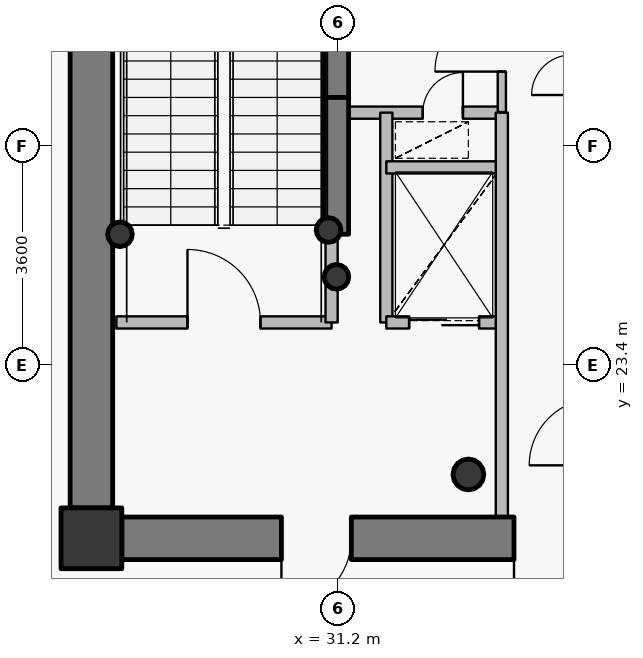
"""IFC4 building model, lengths in metres.
Left out: names, types, materials, properties, quantities, classifications, styles, units other than length and angle.
Written with IfcOpenShell. Run it as: python <this file> out.ifc"""

import sys

from ifc_helpers import new_model, si_unit, direction, frame, frame_2d, origin, origin_2d, place, context, subcontext, project, spatial, rectangle, hollow_circle, extrude, source, transform, mapped, element, fill, save


model = new_model("IFC4")
c1 = context("Model", 3, precision=1e-05, world=origin(), true_north=direction((0.0, 1.0)))
c2 = subcontext(c1, "Body", "Model", "MODEL_VIEW")
j1 = project(units=[si_unit("LENGTHUNIT", "METRE"), si_unit("PLANEANGLEUNIT", "RADIAN")], contexts=[c1])
p1 = place(None, origin())
s1 = spatial("IfcSite", under=j1, at=p1, CompositionType="ELEMENT")
p2 = place(p1, origin())
s2 = spatial("IfcBuilding", under=s1, at=p2, CompositionType="ELEMENT")
p3 = place(p2, frame((0.0, 0.0, 303.0)))
s3 = spatial("IfcBuildingStorey", under=s2, at=p3, CompositionType="ELEMENT", Elevation=303.0)
p4 = place(p3, frame((27.15, 20.55, 0.0), z_axis=(0.0, 0.0, 1.0), x_axis=(1.0, 0.0, 0.0)))
e1 = element("IfcColumn", 1, at=p4, inside=s3, PredefinedType="COLUMN", context=c2, shape_type="SweptSolid", body=[
    extrude(rectangle(XDim=1.0, YDim=1.0, at=origin_2d()), origin(), (0.0, 0.0, 1.0), 3.75),
])
p5 = place(p3, frame((33.35, 21.6, 0.0), z_axis=(0.0, 0.0, 1.0), x_axis=(1.0, 0.0, 0.0)))
e2 = element("IfcColumn", 2, at=p5, inside=s3, PredefinedType="COLUMN", context=c2, shape_type="SweptSolid", body=[
    extrude(hollow_circle(Radius=0.254, WallThickness=0.02, at=origin_2d()), origin(), (0.0, 0.0, 1.0), 3.75),
])
p6 = place(p3, frame((31.18, 27.8, 0.0), z_axis=(0.0, 0.0, 1.0), x_axis=(0.0, 1.0, 0.0)))
e3 = element("IfcWall", 3, at=p6, inside=s3, PredefinedType="SHEAR", context=c2, shape_type="SweptSolid", body=[
    extrude(rectangle(XDim=4.75, YDim=0.4, at=frame_2d((2.375, 0.0))), origin(), (0.0, 0.0, 1.0), 3.75),
])
for number, where, z_axis, x_axis in (
    (4, (31.05, 25.62, 0.0), (0.0, 0.0, 1.0), (1.0, 0.0, 0.0)),
    (5, (31.18, 24.85, 0.0), (0.0, 0.0, 1.0), (1.0, 0.0, 0.0)),
    (6, (27.62, 25.55, 0.0), (0.0, 0.0, 1.0), (1.0, 0.0, 0.0)),
):
    element("IfcColumn", number, at=place(p3, frame(where, z_axis=z_axis, x_axis=x_axis)), inside=s3, PredefinedType="COLUMN", context=c2, shape_type="SweptSolid", body=[
        extrude(hollow_circle(Radius=0.203, WallThickness=0.016, at=origin_2d()), origin(), (0.0, 0.0, 1.0), 3.75),
    ])
p7 = place(p3, frame((44.35, 20.55, 0.0), z_axis=(0.0, 0.0, 1.0), x_axis=(-1.0, 0.0, 0.0)))
e7 = element("IfcWall", 7, at=p7, inside=s3, PredefinedType="SHEAR", context=c2, shape_type="SweptSolid", body=[
    extrude(rectangle(XDim=16.7, YDim=0.7, at=frame_2d((8.35, 0.0))), origin(), (0.0, 0.0, 1.0), 3.05),
])
p8 = place(p7, frame((12.925, 0.0, 0.0)))
e8 = element("IfcOpeningElement", 8, at=p8, cuts=e7, PredefinedType="OPENING", context=c2, shape_type="SweptSolid", body=[
    extrude(rectangle(XDim=1.15, YDim=2.15, at=origin_2d()), frame((0.575, 0.36, 1.075), z_axis=(0.0, -1.0, 0.0), x_axis=(1.0, 0.0, 0.0)), (0.0, 0.0, 1.0), 0.72),
])
p9 = place(p7, frame((9.1, 0.0, 0.0)))
e9 = element("IfcOpeningElement", 9, at=p9, cuts=e7, PredefinedType="OPENING", context=c2, shape_type="SweptSolid", body=[
    extrude(rectangle(XDim=1.15, YDim=2.15, at=origin_2d()), frame((0.575, 0.36, 1.075), z_axis=(0.0, -1.0, 0.0), x_axis=(1.0, 0.0, 0.0)), (0.0, 0.0, 1.0), 0.72),
])
p10 = place(p3, frame((27.15, 21.05, 0.0), z_axis=(0.0, 0.0, 1.0), x_axis=(0.0, 1.0, 0.0)))
e10 = element("IfcWall", 10, at=p10, inside=s3, PredefinedType="SHEAR", context=c2, shape_type="SweptSolid", body=[
    extrude(rectangle(XDim=11.9, YDim=0.7, at=frame_2d((5.95, 0.0))), origin(), (0.0, 0.0, 1.0), 3.05),
])
p11 = place(p3, frame((31.18, 25.55, 0.0), z_axis=(0.0, 0.0, 1.0), x_axis=(0.0, 1.0, 0.0)))
e11 = element("IfcWall", 11, at=p11, inside=s3, PredefinedType="SHEAR", context=c2, shape_type="SweptSolid", body=[
    extrude(rectangle(XDim=2.25, YDim=0.4, at=frame_2d((1.125, 0.0))), origin(), (0.0, 0.0, 1.0), 3.1),
])
p12 = place(p3, frame((27.56, 24.1, 0.0), z_axis=(0.0, 0.0, 1.0), x_axis=(1.0, 0.0, 0.0)))
e12 = element("IfcWall", 12, at=p12, inside=s3, PredefinedType="PARTITIONING", context=c2, shape_type="SweptSolid", body=[
    extrude(rectangle(XDim=3.54, YDim=0.2, at=frame_2d((1.77, 0.0))), origin(), (0.0, 0.0, 1.0), 3.5),
])
p13 = place(p12, frame((1.17, 0.0, 0.0)))
e13 = element("IfcOpeningElement", 13, at=p13, cuts=e12, PredefinedType="OPENING", context=c2, shape_type="SweptSolid", body=[
    extrude(rectangle(XDim=1.2, YDim=2.15, at=origin_2d()), frame((0.6, 0.11, 1.075), z_axis=(0.0, -1.0, 0.0), x_axis=(1.0, 0.0, 0.0)), (0.0, 0.0, 1.0), 0.22),
])
p14 = place(p3, frame((31.1, 24.1, 0.0), z_axis=(0.0, 0.0, 1.0), x_axis=(0.0, 1.0, 0.0)))
e14 = element("IfcWall", 14, at=p14, inside=s3, PredefinedType="PARTITIONING", context=c2, shape_type="SweptSolid", body=[
    extrude(rectangle(XDim=1.44, YDim=0.2, at=frame_2d((0.72, 0.0))), origin(), (0.0, 0.0, 1.0), 3.5),
])
p15 = place(p3, frame((31.1, 27.55, 0.0), z_axis=(0.0, 0.0, 1.0), x_axis=(1.0, 0.0, 0.0)))
e15 = element("IfcWall", 15, at=p15, inside=s3, PredefinedType="PARTITIONING", context=c2, shape_type="SweptSolid", body=[
    extrude(rectangle(XDim=2.8, YDim=0.2, at=frame_2d((1.4, 0.0))), origin(), (0.0, 0.0, 1.0), 3.085),
])
p16 = place(p15, frame((1.5, 0.0, 0.0)))
e16 = element("IfcOpeningElement", 16, at=p16, cuts=e15, PredefinedType="OPENING", context=c2, shape_type="SweptSolid", body=[
    extrude(rectangle(XDim=0.66, YDim=2.05, at=origin_2d()), frame((0.33, 0.11, 1.025), z_axis=(0.0, -1.0, 0.0), x_axis=(1.0, 0.0, 0.0)), (0.0, 0.0, 1.0), 0.22),
])
p17 = place(p3, frame((32.0, 24.1, 0.0), z_axis=(0.0, 0.0, 1.0), x_axis=(0.0, 1.0, 0.0)))
e17 = element("IfcWall", 17, at=p17, inside=s3, PredefinedType="PARTITIONING", context=c2, shape_type="SweptSolid", body=[
    extrude(rectangle(XDim=3.45, YDim=0.2, at=frame_2d((1.725, 0.0))), origin(), (0.0, 0.0, 1.0), 3.5),
])
p18 = place(p3, frame((32.0, 24.1, 0.0), z_axis=(0.0, 0.0, 1.0), x_axis=(1.0, 0.0, 0.0)))
e18 = element("IfcWall", 18, at=p18, inside=s3, PredefinedType="PARTITIONING", context=c2, shape_type="SweptSolid", body=[
    extrude(rectangle(XDim=1.9, YDim=0.2, at=frame_2d((0.95, 0.0))), origin(), (0.0, 0.0, 1.0), 3.085),
])
p19 = place(p18, frame((0.375, 0.0, 0.0)))
e19 = element("IfcOpeningElement", 19, at=p19, cuts=e18, PredefinedType="OPENING", context=c2, shape_type="SweptSolid", body=[
    extrude(rectangle(XDim=1.15, YDim=2.15, at=origin_2d()), frame((0.575, 0.11, 1.075), z_axis=(0.0, -1.0, 0.0), x_axis=(1.0, 0.0, 0.0)), (0.0, 0.0, 1.0), 0.22),
])
p20 = place(p3, frame((32.0, 26.65, 0.0), z_axis=(0.0, 0.0, 1.0), x_axis=(1.0, 0.0, 0.0)))
e20 = element("IfcWall", 20, at=p20, inside=s3, PredefinedType="PARTITIONING", context=c2, shape_type="SweptSolid", body=[
    extrude(rectangle(XDim=1.9, YDim=0.2, at=frame_2d((0.95, 0.0))), origin(), (0.0, 0.0, 1.0), 3.085),
])
p21 = place(p3, frame((33.9, 20.9, 0.0), z_axis=(0.0, 0.0, 1.0), x_axis=(0.0, 1.0, 0.0)))
e21 = element("IfcWall", 21, at=p21, inside=s3, PredefinedType="PARTITIONING", context=c2, shape_type="SweptSolid", body=[
    extrude(rectangle(XDim=6.65, YDim=0.2, at=frame_2d((3.325, 0.0))), origin(), (0.0, 0.0, 1.0), 3.085),
])
p22 = place(p3, frame((33.9, 27.56, 0.0), z_axis=(0.0, 0.0, 1.0), x_axis=(0.0, 1.0, 0.0)))
e22 = element("IfcWall", 22, at=p22, inside=s3, PredefinedType="PARTITIONING", context=c2, shape_type="SweptSolid", body=[
    extrude(rectangle(XDim=5.54, YDim=0.135, at=frame_2d((2.77, 0.0))), origin(), (0.0, 0.0, 1.0), 3.085),
])
p23 = place(p22, frame((0.665, 0.0, 0.0)))
e23 = element("IfcOpeningElement", 23, at=p23, cuts=e22, PredefinedType="OPENING", context=c2, shape_type="SweptSolid", body=[
    extrude(rectangle(XDim=1.1, YDim=2.15, at=origin_2d()), frame((0.55, 0.078, 1.075), z_axis=(0.0, -1.0, 0.0), x_axis=(1.0, 0.0, 0.0)), (0.0, 0.0, 1.0), 0.155),
])
p24 = place(p22, frame((3.117, 0.0, 0.0)))
e24 = element("IfcOpeningElement", 24, at=p24, cuts=e22, PredefinedType="OPENING", context=c2, shape_type="SweptSolid", body=[
    extrude(rectangle(XDim=1.1, YDim=2.15, at=origin_2d()), frame((0.55, 0.078, 1.075), z_axis=(0.0, -1.0, 0.0), x_axis=(1.0, 0.0, 0.0)), (0.0, 0.0, 1.0), 0.155),
])
p25 = place(p3, frame((26.8, 21.04, 0.0), z_axis=(0.0, 0.0, 1.0), x_axis=(0.0, -1.0, 0.0)))
e25 = element("IfcWall", 25, at=p25, inside=s3, PredefinedType="PARTITIONING", context=c2, shape_type="SweptSolid", body=[
    extrude(rectangle(XDim=0.84, YDim=0.135, at=frame_2d((0.42, 0.0))), origin(), (0.0, 0.0, 1.0), 3.035),
])
p26 = place(p3, frame((27.107, 20.2, 0.0), z_axis=(0.0, 0.0, 1.0), x_axis=(1.0, 0.0, 0.0)))
e26 = element("IfcWall", 26, at=p26, inside=s3, PredefinedType="PARTITIONING", context=c2, shape_type="SweptSolid", body=[
    extrude(rectangle(XDim=0.532, YDim=0.135, at=frame_2d((0.266, 0.0))), origin(), (0.0, 0.0, 1.0), 3.035),
])
m1 = source(origin(), c2, "Body", "SweptSolid", [
    extrude(rectangle(XDim=1.15, YDim=2.15, at=origin_2d()), frame((0.575, 0.025, 1.075), z_axis=(0.0, -1.0, 0.0), x_axis=(1.0, 0.0, 0.0)), (0.0, 0.0, 1.0), 0.05),
])
p27 = place(p8, origin())
e27 = element("IfcDoor", 27, at=p27, inside=s3, OperationType="SINGLE_SWING_RIGHT", PredefinedType="DOOR", context=c2, shape_type="MappedRepresentation", body=[
    mapped(m1, transform((0.0, 0.0, 0.0), x_axis=(1.0, 0.0, 0.0), y_axis=(0.0, 1.0, 0.0), z_axis=(0.0, 0.0, 1.0), scale=1.0)),
])
fill(e8, e27)
p28 = place(p9, origin())
e28 = element("IfcDoor", 28, at=p28, inside=s3, OperationType="SINGLE_SWING_RIGHT", PredefinedType="DOOR", context=c2, shape_type="MappedRepresentation", body=[
    mapped(m1, transform((0.0, 0.0, 0.0), x_axis=(1.0, 0.0, 0.0), y_axis=(0.0, 1.0, 0.0), z_axis=(0.0, 0.0, 1.0), scale=1.0)),
])
fill(e9, e28)
m2 = source(origin(), c2, "Body", "SweptSolid", [
    extrude(rectangle(XDim=1.2, YDim=2.15, at=origin_2d()), frame((0.6, 0.025, 1.075), z_axis=(0.0, -1.0, 0.0), x_axis=(1.0, 0.0, 0.0)), (0.0, 0.0, 1.0), 0.05),
])
p29 = place(p13, origin())
e29 = element("IfcDoor", 29, at=p29, inside=s3, OperationType="SINGLE_SWING_LEFT", PredefinedType="DOOR", context=c2, shape_type="MappedRepresentation", body=[
    mapped(m2, transform((0.0, 0.0, 0.0), x_axis=(1.0, 0.0, 0.0), y_axis=(0.0, 1.0, 0.0), z_axis=(0.0, 0.0, 1.0), scale=1.0)),
])
fill(e13, e29)
m3 = source(origin(), c2, "Body", "SweptSolid", [
    extrude(rectangle(XDim=1.15, YDim=2.15, at=origin_2d()), frame((0.575, 0.025, 1.075), z_axis=(0.0, -1.0, 0.0), x_axis=(1.0, 0.0, 0.0)), (0.0, 0.0, 1.0), 0.05),
])
p30 = place(p19, origin())
e30 = element("IfcDoor", 30, at=p30, inside=s3, OperationType="DOUBLE_DOOR_SLIDING", PredefinedType="USERDEFINED", context=c2, shape_type="MappedRepresentation", body=[
    mapped(m3, transform((0.0, 0.0, 0.0), x_axis=(1.0, 0.0, 0.0), y_axis=(0.0, 1.0, 0.0), z_axis=(0.0, 0.0, 1.0), scale=1.0)),
])
fill(e19, e30)
m4 = source(origin(), c2, "Body", "SweptSolid", [
    extrude(rectangle(XDim=1.1, YDim=2.15, at=origin_2d()), frame((0.55, 0.025, 1.075), z_axis=(0.0, -1.0, 0.0), x_axis=(1.0, 0.0, 0.0)), (0.0, 0.0, 1.0), 0.05),
])
p31 = place(p23, origin())
e31 = element("IfcDoor", 31, at=p31, inside=s3, OperationType="SINGLE_SWING_LEFT", PredefinedType="DOOR", context=c2, shape_type="MappedRepresentation", body=[
    mapped(m4, transform((0.0, 0.0, 0.0), x_axis=(1.0, 0.0, 0.0), y_axis=(0.0, 1.0, 0.0), z_axis=(0.0, 0.0, 1.0), scale=1.0)),
])
fill(e23, e31)
m5 = source(origin(), c2, "Body", "SweptSolid", [
    extrude(rectangle(XDim=0.66, YDim=2.05, at=origin_2d()), frame((0.33, 0.025, 1.025), z_axis=(0.0, -1.0, 0.0), x_axis=(1.0, 0.0, 0.0)), (0.0, 0.0, 1.0), 0.05),
])
p32 = place(p16, origin())
e32 = element("IfcDoor", 32, at=p32, inside=s3, OperationType="SINGLE_SWING_RIGHT", PredefinedType="USERDEFINED", context=c2, shape_type="MappedRepresentation", body=[
    mapped(m5, transform((0.0, 0.0, 0.0), x_axis=(1.0, 0.0, 0.0), y_axis=(0.0, 1.0, 0.0), z_axis=(0.0, 0.0, 1.0), scale=1.0)),
])
fill(e16, e32)
save(model, sys.argv[1])
